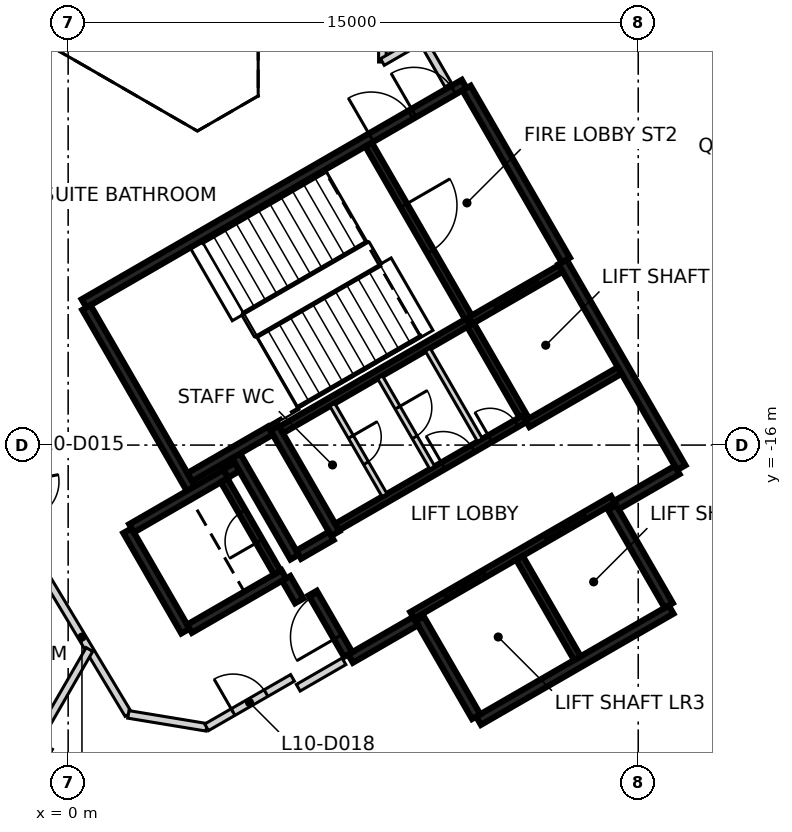
"""IFC4 building model, lengths in metres.
Left out: names, types, materials, properties, quantities, classifications, styles, units other than length and angle.
Written with IfcOpenShell. Run it as: python <this file> out.ifc"""

import sys

from ifc_helpers import new_model, si_unit, direction, frame, frame_2d, origin, place, context, subcontext, project, spatial, rectangle, extrude, element, fill, save


model = new_model("IFC4")
c1 = context("Model", 3, precision=1e-05, world=origin(), true_north=direction((0.0, 1.0)))
c2 = subcontext(c1, "Body", "Model", "MODEL_VIEW")
j1 = project(units=[si_unit("LENGTHUNIT", "METRE"), si_unit("PLANEANGLEUNIT", "RADIAN")], contexts=[c1])
p1 = place(None, origin())
s1 = spatial("IfcSite", under=j1, at=p1, CompositionType="ELEMENT")
p2 = place(p1, origin())
s2 = spatial("IfcBuilding", under=s1, at=p2, CompositionType="ELEMENT")
p3 = place(p2, frame((0.0, 0.0, 49.4)))
s3 = spatial("IfcBuildingStorey", under=s2, at=p3, CompositionType="ELEMENT", Elevation=49.4)
p4 = place(p3, frame((0.417, -12.273, 0.0), z_axis=(0.0, 0.0, 1.0), x_axis=(0.866021906294, 0.500006057782, 0.0)))
e1 = element("IfcWall", 1, at=p4, inside=s3, PredefinedType="SHEAR", context=c2, shape_type="SweptSolid", body=[
    extrude(rectangle(XDim=11.55, YDim=0.25, at=frame_2d((5.775, 0.0))), origin(), (0.0, 0.0, 1.0), 3.125),
])
p5 = place(p4, frame((10.025, 0.0, 0.0)))
e2 = element("IfcOpeningElement", 2, at=p5, cuts=e1, PredefinedType="OPENING", context=c2, shape_type="SweptSolid", body=[
    extrude(rectangle(XDim=1.2, YDim=2.1, at=frame_2d((0.6, 1.05))), frame((0.0, 0.135, 0.0), z_axis=(0.0, -1.0, 0.0), x_axis=(1.0, 0.0, 0.0)), (0.0, 0.0, 1.0), 0.27),
])
p6 = place(p4, frame((8.725, 0.0, 0.0)))
e3 = element("IfcOpeningElement", 3, at=p6, cuts=e1, PredefinedType="OPENING", context=c2, shape_type="SweptSolid", body=[
    extrude(rectangle(XDim=1.2, YDim=2.1, at=frame_2d((0.6, 1.05))), frame((0.0, 0.135, 0.0), z_axis=(0.0, -1.0, 0.0), x_axis=(1.0, 0.0, 0.0)), (0.0, 0.0, 1.0), 0.27),
])
p7 = place(p3, frame((13.008, -11.181, 0.0), z_axis=(0.0, 0.0, 1.0), x_axis=(0.500004234368, -0.866022959057, 0.0)))
e4 = element("IfcWall", 4, at=p7, inside=s3, PredefinedType="SHEAR", context=c2, shape_type="SweptSolid", body=[
    extrude(rectangle(XDim=6.25, YDim=0.25, at=frame_2d((3.125, 0.0))), origin(), (0.0, 0.0, 1.0), 3.125),
])
p8 = place(p3, frame((15.865, -20.328, 0.0), z_axis=(0.0, 0.0, 1.0), x_axis=(-0.86602852612, -0.499994591916, 0.0)))
e5 = element("IfcWall", 5, at=p8, inside=s3, PredefinedType="SHEAR", context=c2, shape_type="SweptSolid", body=[
    extrude(rectangle(XDim=5.85, YDim=0.25, at=frame_2d((2.925, 0.0))), origin(), (0.0, 0.0, 1.0), 3.125),
])
p9 = place(p3, frame((3.235, -17.153, 0.0), z_axis=(0.0, 0.0, 1.0), x_axis=(-0.500008851346, 0.866020293397, 0.0)))
e6 = element("IfcWall", 6, at=p9, inside=s3, PredefinedType="SHEAR", context=c2, shape_type="SweptSolid", body=[
    extrude(rectangle(XDim=5.51, YDim=0.25, at=frame_2d((2.755, 0.0))), origin(), (0.0, 0.0, 1.0), 3.125),
])
p10 = place(p3, frame((10.483, -6.606, 0.0), z_axis=(0.0, 0.0, 1.0), x_axis=(0.49999885962, -0.866026062182, 0.0)))
e7 = element("IfcWall", 7, at=p10, inside=s3, PredefinedType="SHEAR", context=c2, shape_type="SweptSolid", body=[
    extrude(rectangle(XDim=5.225, YDim=0.25, at=frame_2d((2.612, 0.0))), origin(), (0.0, 0.0, 1.0), 3.125),
])
p11 = place(p3, frame((7.031, -18.327, 0.0), z_axis=(0.0, 0.0, 1.0), x_axis=(-0.499971222258, 0.866042017984, 0.0)))
e8 = element("IfcWall", 8, at=p11, inside=s3, PredefinedType="SHEAR", context=c2, shape_type="SweptSolid", body=[
    extrude(rectangle(XDim=3.2, YDim=0.25, at=frame_2d((1.6, 0.0))), origin(), (0.0, 0.0, 1.0), 3.125),
])
for number, where, z_axis, x_axis in (
    (9, (14.315, -17.644, 0.0), (0.0, 0.0, 1.0), (0.5, -0.866, 0.0)),
    (10, (10.736, -23.145, 0.0), (0.0, 0.0, 1.0), (-0.5, 0.866, 0.0)),
):
    element("IfcWall", number, at=place(p3, frame(where, z_axis=z_axis, x_axis=x_axis)), inside=s3, PredefinedType="SHEAR", context=c2, shape_type="SweptSolid", body=[
        extrude(rectangle(XDim=2.974, YDim=0.25, at=frame_2d((1.487, 0.0))), origin(), (0.0, 0.0, 1.0), 3.125),
    ])
p12 = place(p3, frame((3.085, -20.894, 0.0), z_axis=(0.0, 0.0, 1.0), x_axis=(-0.499978833458, 0.866037623948, 0.0)))
e11 = element("IfcWall", 11, at=p12, inside=s3, PredefinedType="SHEAR", context=c2, shape_type="SweptSolid", body=[
    extrude(rectangle(XDim=3.05, YDim=0.25, at=frame_2d((1.525, 0.0))), origin(), (0.0, 0.0, 1.0), 3.125),
])
p13 = place(p3, frame((1.669, -18.19, 0.0), z_axis=(0.0, 0.0, 1.0), x_axis=(0.866042235819, 0.499970844928, 0.0)))
e12 = element("IfcWall", 12, at=p13, inside=s3, PredefinedType="SHEAR", context=c2, shape_type="SweptSolid", body=[
    extrude(rectangle(XDim=2.865, YDim=0.25, at=frame_2d((1.432, 0.0))), origin(), (0.0, 0.0, 1.0), 3.125),
])
p14 = place(p3, frame((5.675, -19.399, 0.0), z_axis=(0.0, 0.0, 1.0), x_axis=(-0.866026637627, -0.499997862916, 0.0)))
e13 = element("IfcWall", 13, at=p14, inside=s3, PredefinedType="SHEAR", context=c2, shape_type="SweptSolid", body=[
    extrude(rectangle(XDim=2.865, YDim=0.25, at=frame_2d((1.432, 0.0))), origin(), (0.0, 0.0, 1.0), 3.125),
])
p15 = place(p3, frame((4.414, -16.276, 0.0), z_axis=(0.0, 0.0, 1.0), x_axis=(0.500003324108, -0.866023484601, 0.0)))
e14 = element("IfcWall", 14, at=p15, inside=s3, PredefinedType="SHEAR", context=c2, shape_type="SweptSolid", body=[
    extrude(rectangle(XDim=3.085, YDim=0.25, at=frame_2d((1.542, 0.0))), origin(), (0.0, 0.0, 1.0), 3.125),
])
p16 = place(p3, frame((5.322, -15.619, 0.0), z_axis=(0.0, 0.0, 1.0), x_axis=(-0.866026229868, -0.499998569178, 0.0)))
e15 = element("IfcWall", 15, at=p16, inside=s3, PredefinedType="SHEAR", context=c2, shape_type="SweptSolid", body=[
    extrude(rectangle(XDim=2.449, YDim=0.25, at=frame_2d((1.225, 0.0))), origin(), (0.0, 0.0, 1.0), 3.125),
])
p17 = place(p3, frame((9.14, -20.631, 0.0), z_axis=(0.0, 0.0, 1.0), x_axis=(-0.866043531843, -0.499968599967, 0.0)))
e16 = element("IfcWall", 16, at=p17, inside=s3, PredefinedType="SHEAR", context=c2, shape_type="SweptSolid", body=[
    extrude(rectangle(XDim=1.975, YDim=0.25, at=frame_2d((0.987, 0.0))), origin(), (0.0, 0.0, 1.0), 3.125),
])
p18 = place(p3, frame((16.025, -16.656, 0.0), z_axis=(0.0, 0.0, 1.0), x_axis=(-0.866016279763, -0.500015802937, 0.0)))
e17 = element("IfcWall", 17, at=p18, inside=s3, PredefinedType="SHEAR", context=c2, shape_type="SweptSolid", body=[
    extrude(rectangle(XDim=1.849, YDim=0.25, at=frame_2d((0.925, 0.0))), origin(), (0.0, 0.0, 1.0), 3.125),
])
p19 = place(p3, frame((7.367, -21.51, 0.0), z_axis=(0.0, 0.0, 1.0), x_axis=(-0.499983108224, 0.866035156036, 0.0)))
e18 = element("IfcWall", 18, at=p19, inside=s3, PredefinedType="SHEAR", context=c2, shape_type="SweptSolid", body=[
    extrude(rectangle(XDim=1.865, YDim=0.25, at=frame_2d((0.932, 0.0))), origin(), (0.0, 0.0, 1.0), 3.125),
])
p20 = place(p19, frame((0.535, 0.0, 0.0)))
e19 = element("IfcOpeningElement", 19, at=p20, cuts=e18, PredefinedType="OPENING", context=c2, shape_type="SweptSolid", body=[
    extrude(rectangle(XDim=1.25, YDim=2.1, at=frame_2d((0.625, 1.05))), frame((0.0, 0.135, 0.0), z_axis=(0.0, -1.0, 0.0), x_axis=(1.0, 0.0, 0.0)), (0.0, 0.0, 1.0), 0.27),
])
p21 = place(p3, frame((6.065, -18.885, 0.0), z_axis=(0.0, 0.0, 1.0), x_axis=(0.866017078145, 0.500014420154, 0.0)))
e20 = element("IfcWall", 20, at=p21, inside=s3, PredefinedType="SHEAR", context=c2, shape_type="SweptSolid", body=[
    extrude(rectangle(XDim=0.989, YDim=0.25, at=frame_2d((0.495, 0.0))), origin(), (0.0, 0.0, 1.0), 3.125),
])
p22 = place(p3, frame((6.08, -20.1, 0.0), z_axis=(0.0, 0.0, 1.0), x_axis=(-0.500051773299, 0.865995510393, 0.0)))
e21 = element("IfcWall", 21, at=p22, inside=s3, PredefinedType="SHEAR", context=c2, shape_type="SweptSolid", body=[
    extrude(rectangle(XDim=0.685, YDim=0.25, at=frame_2d((0.342, 0.0))), origin(), (0.0, 0.0, 1.0), 3.125),
])
p23 = place(p3, frame((4.145, -16.749, 0.0), z_axis=(0.0, 0.0, 1.0), x_axis=(0.866185586049, 0.49972245349, 0.0)))
e22 = element("IfcWall", 22, at=p23, inside=s3, PredefinedType="SHEAR", context=c2, shape_type="SweptSolid", body=[
    extrude(rectangle(XDim=0.344, YDim=0.25, at=frame_2d((0.172, 0.0))), origin(), (0.0, 0.0, 1.0), 3.125),
])
p24 = place(p3, frame((9.052, -20.48, 0.0), z_axis=(0.0, 0.0, 1.0), x_axis=(0.866030299012, 0.499991521122, 0.0)))
e23 = element("IfcWall", 23, at=p24, inside=s3, PredefinedType="SHEAR", context=c2, shape_type="SweptSolid", body=[
    extrude(rectangle(XDim=6.1, YDim=0.2, at=frame_2d((3.05, 0.0))), origin(), (0.0, 0.0, 1.0), 3.125),
])
p25 = place(p24, frame((1.0, 0.0, 0.0)))
e24 = element("IfcOpeningElement", 24, at=p25, cuts=e23, PredefinedType="OPENING", context=c2, shape_type="SweptSolid", body=[
    extrude(rectangle(XDim=1.2, YDim=2.1, at=frame_2d((0.6, 1.05))), frame((0.0, 0.11, 0.0), z_axis=(0.0, -1.0, 0.0), x_axis=(1.0, 0.0, 0.0)), (0.0, 0.0, 1.0), 0.22),
])
p26 = place(p24, frame((4.05, 0.0, 0.0)))
e25 = element("IfcOpeningElement", 25, at=p26, cuts=e23, PredefinedType="OPENING", context=c2, shape_type="SweptSolid", body=[
    extrude(rectangle(XDim=1.2, YDim=2.1, at=frame_2d((0.6, 1.05))), frame((0.0, 0.11, 0.0), z_axis=(0.0, -1.0, 0.0), x_axis=(1.0, 0.0, 0.0)), (0.0, 0.0, 1.0), 0.22),
])
p27 = place(p3, frame((10.538, -12.752, 0.0), z_axis=(0.0, 0.0, 1.0), x_axis=(-0.866038630372, -0.499977090179, 0.0)))
e26 = element("IfcWall", 26, at=p27, inside=s3, PredefinedType="SHEAR", context=c2, shape_type="SweptSolid", body=[
    extrude(rectangle(XDim=5.699, YDim=0.2, at=frame_2d((2.85, 0.0))), origin(), (0.0, 0.0, 1.0), 3.125),
])
p28 = place(p3, frame((7.077, -18.156, 0.0), z_axis=(0.0, 0.0, 1.0), x_axis=(0.866038630372, 0.499977090179, 0.0)))
e27 = element("IfcWall", 27, at=p28, inside=s3, PredefinedType="SHEAR", context=c2, shape_type="SweptSolid", body=[
    extrude(rectangle(XDim=5.699, YDim=0.2, at=frame_2d((2.85, 0.0))), origin(), (0.0, 0.0, 1.0), 3.125),
])
p29 = place(p28, frame((3.224, 0.0, 0.0)))
e28 = element("IfcOpeningElement", 28, at=p29, cuts=e27, PredefinedType="OPENING", context=c2, shape_type="SweptSolid", body=[
    extrude(rectangle(XDim=0.9, YDim=2.1, at=frame_2d((0.45, 1.05))), frame((0.0, 0.11, 0.0), z_axis=(0.0, -1.0, 0.0), x_axis=(1.0, 0.0, 0.0)), (0.0, 0.0, 1.0), 0.22),
])
p30 = place(p28, frame((4.649, 0.0, 0.0)))
e29 = element("IfcOpeningElement", 29, at=p30, cuts=e27, PredefinedType="OPENING", context=c2, shape_type="SweptSolid", body=[
    extrude(rectangle(XDim=0.8, YDim=2.1, at=frame_2d((0.4, 1.05))), frame((0.0, 0.11, 0.0), z_axis=(0.0, -1.0, 0.0), x_axis=(1.0, 0.0, 0.0)), (0.0, 0.0, 1.0), 0.22),
])
p31 = place(p3, frame((7.906, -8.094, 0.0), z_axis=(0.0, 0.0, 1.0), x_axis=(0.500024287448, -0.866011380966, 0.0)))
e30 = element("IfcWall", 30, at=p31, inside=s3, PredefinedType="SHEAR", context=c2, shape_type="SweptSolid", body=[
    extrude(rectangle(XDim=5.251, YDim=0.2, at=frame_2d((2.625, 0.0))), origin(), (0.0, 0.0, 1.0), 3.125),
])
p32 = place(p31, frame((1.849, 0.0, 0.0)))
e31 = element("IfcOpeningElement", 31, at=p32, cuts=e30, PredefinedType="OPENING", context=c2, shape_type="SweptSolid", body=[
    extrude(rectangle(XDim=1.4, YDim=2.1, at=frame_2d((0.7, 1.05))), frame((0.0, 0.11, 0.0), z_axis=(0.0, -1.0, 0.0), x_axis=(1.0, 0.0, 0.0)), (0.0, 0.0, 1.0), 0.22),
])
p33 = place(p3, frame((11.875, -18.967, 0.0), z_axis=(0.0, 0.0, 1.0), x_axis=(0.49998131003, -0.866036194175, 0.0)))
e32 = element("IfcWall", 32, at=p33, inside=s3, PredefinedType="SHEAR", context=c2, shape_type="SweptSolid", body=[
    extrude(rectangle(XDim=3.048, YDim=0.2, at=frame_2d((1.524, 0.0))), origin(), (0.0, 0.0, 1.0), 3.125),
])
p34 = place(p3, frame((5.503, -19.352, 0.0), z_axis=(0.0, 0.0, 1.0), x_axis=(-0.499986818241, 0.866033014143, 0.0)))
e33 = element("IfcWall", 33, at=p34, inside=s3, PredefinedType="SHEAR", context=c2, shape_type="SweptSolid", body=[
    extrude(rectangle(XDim=2.798, YDim=0.2, at=frame_2d((1.399, 0.0))), origin(), (0.0, 0.0, 1.0), 3.125),
])
p35 = place(p34, frame((0.949, 0.0, 0.0)))
e34 = element("IfcOpeningElement", 34, at=p35, cuts=e33, PredefinedType="OPENING", context=c2, shape_type="SweptSolid", body=[
    extrude(rectangle(XDim=0.9, YDim=2.1, at=frame_2d((0.45, 1.05))), frame((0.0, 0.11, 0.0), z_axis=(0.0, -1.0, 0.0), x_axis=(1.0, 0.0, 0.0)), (0.0, 0.0, 1.0), 0.22),
])
p36 = place(p3, frame((11.963, -15.22, 0.0), z_axis=(0.0, 0.0, 1.0), x_axis=(-0.500034990121, 0.866005201286, 0.0)))
e35 = element("IfcWall", 35, at=p36, inside=s3, PredefinedType="SHEAR", context=c2, shape_type="SweptSolid", body=[
    extrude(rectangle(XDim=2.75, YDim=0.2, at=frame_2d((1.375, 0.0))), origin(), (0.0, 0.0, 1.0), 3.125),
])
p37 = place(p3, frame((10.587, -12.723, 0.0), z_axis=(0.0, 0.0, 1.0), x_axis=(0.866037306777, 0.499979382845, 0.0)))
e36 = element("IfcWall", 36, at=p37, inside=s3, PredefinedType="SHEAR", context=c2, shape_type="SweptSolid", body=[
    extrude(rectangle(XDim=2.742, YDim=0.2, at=frame_2d((1.371, 0.0))), origin(), (0.0, 0.0, 1.0), 3.125),
])
p38 = place(p37, frame((0.743, 0.0, 0.0)))
e37 = element("IfcOpeningElement", 37, at=p38, cuts=e36, PredefinedType="OPENING", context=c2, shape_type="SweptSolid", body=[
    extrude(rectangle(XDim=1.3, YDim=2.1, at=frame_2d((0.65, 1.05))), frame((0.0, 0.11, 0.0), z_axis=(0.0, -1.0, 0.0), x_axis=(1.0, 0.0, 0.0)), (0.0, 0.0, 1.0), 0.22),
])
p39 = place(p3, frame((14.512, -14.037, 0.0), z_axis=(0.0, 0.0, 1.0), x_axis=(-0.866044696403, -0.499966582715, 0.0)))
e38 = element("IfcWall", 38, at=p39, inside=s3, PredefinedType="SHEAR", context=c2, shape_type="SweptSolid", body=[
    extrude(rectangle(XDim=2.799, YDim=0.2, at=frame_2d((1.399, 0.0))), origin(), (0.0, 0.0, 1.0), 3.125),
])
p40 = place(p3, frame((8.207, -14.214, 0.0), z_axis=(0.0, 0.0, 1.0), x_axis=(0.50002746344, -0.86600954718, 0.0)))
e39 = element("IfcWall", 39, at=p40, inside=s3, PredefinedType="PARTITIONING", context=c2, shape_type="SweptSolid", body=[
    extrude(rectangle(XDim=2.748, YDim=0.15, at=frame_2d((1.374, 0.0))), origin(), (0.0, 0.0, 1.0), 3.125),
])
p41 = place(p40, frame((0.924, 0.0, 0.0)))
e40 = element("IfcOpeningElement", 40, at=p41, cuts=e39, PredefinedType="OPENING", context=c2, shape_type="SweptSolid", body=[
    extrude(rectangle(XDim=0.9, YDim=2.1, at=frame_2d((0.45, 1.05))), frame((0.0, 0.085, 0.0), z_axis=(0.0, -1.0, 0.0), x_axis=(1.0, 0.0, 0.0)), (0.0, 0.0, 1.0), 0.17),
])
p42 = place(p3, frame((9.462, -13.489, 0.0), z_axis=(0.0, 0.0, 1.0), x_axis=(0.499988999718, -0.866031754707, 0.0)))
e41 = element("IfcWall", 41, at=p42, inside=s3, PredefinedType="PARTITIONING", context=c2, shape_type="SweptSolid", body=[
    extrude(rectangle(XDim=2.749, YDim=0.15, at=frame_2d((1.374, 0.0))), origin(), (0.0, 0.0, 1.0), 3.125),
])
p43 = place(p3, frame((6.951, -14.939, 0.0), z_axis=(0.0, 0.0, 1.0), x_axis=(0.499988999718, -0.866031754707, 0.0)))
e42 = element("IfcWall", 42, at=p43, inside=s3, PredefinedType="PARTITIONING", context=c2, shape_type="SweptSolid", body=[
    extrude(rectangle(XDim=2.749, YDim=0.15, at=frame_2d((1.374, 0.0))), origin(), (0.0, 0.0, 1.0), 3.125),
])
p44 = place(p43, frame((0.974, 0.0, 0.0)))
e43 = element("IfcOpeningElement", 43, at=p44, cuts=e42, PredefinedType="OPENING", context=c2, shape_type="SweptSolid", body=[
    extrude(rectangle(XDim=0.8, YDim=2.1, at=frame_2d((0.4, 1.05))), frame((0.0, 0.085, 0.0), z_axis=(0.0, -1.0, 0.0), x_axis=(1.0, 0.0, 0.0)), (0.0, 0.0, 1.0), 0.17),
])
p45 = place(p3, frame((-0.858, -19.017, 0.0), z_axis=(0.0, 0.0, 1.0), x_axis=(0.514647068805, -0.857402119528, 0.0)))
e44 = element("IfcWall", 44, at=p45, inside=s3, PredefinedType="PARTITIONING", context=c2, shape_type="SweptSolid", body=[
    extrude(rectangle(XDim=4.745, YDim=0.2, at=frame_2d((2.373, 0.0))), origin(), (0.0, 0.0, 1.0), 3.125),
])
p46 = place(p3, frame((1.584, -23.086, 0.0), z_axis=(0.0, 0.0, 1.0), x_axis=(0.986633159246, -0.162957077405, 0.0)))
e45 = element("IfcWall", 45, at=p46, inside=s3, PredefinedType="PARTITIONING", context=c2, shape_type="SweptSolid", body=[
    extrude(rectangle(XDim=2.087, YDim=0.2, at=frame_2d((1.043, 0.0))), origin(), (0.0, 0.0, 1.0), 3.125),
])
p47 = place(p3, frame((3.643, -23.426, 0.0), z_axis=(0.0, 0.0, 1.0), x_axis=(0.866654350985, 0.498909045738, 0.0)))
e46 = element("IfcWall", 46, at=p47, inside=s3, PredefinedType="PARTITIONING", context=c2, shape_type="SweptSolid", body=[
    extrude(rectangle(XDim=2.608, YDim=0.2, at=frame_2d((1.304, 0.0))), origin(), (0.0, 0.0, 1.0), 3.125),
])
p48 = place(p47, frame((0.804, 0.0, 0.0)))
e47 = element("IfcOpeningElement", 47, at=p48, cuts=e46, PredefinedType="OPENING", context=c2, shape_type="SweptSolid", body=[
    extrude(rectangle(XDim=1.0, YDim=2.1, at=frame_2d((0.5, 1.05))), frame((0.0, 0.11, 0.0), z_axis=(0.0, -1.0, 0.0), x_axis=(1.0, 0.0, 0.0)), (0.0, 0.0, 1.0), 0.22),
])
p49 = place(p3, frame((6.054, -22.385, 0.0), z_axis=(0.0, 0.0, 1.0), x_axis=(0.86593101922, 0.500163443238, 0.0)))
e48 = element("IfcWall", 48, at=p49, inside=s3, PredefinedType="PARTITIONING", context=c2, shape_type="SweptSolid", body=[
    extrude(rectangle(XDim=1.39, YDim=0.2, at=frame_2d((0.695, 0.0))), origin(), (0.0, 0.0, 1.0), 3.125),
])
p50 = place(p3, frame((8.268, -5.921, 0.0), z_axis=(0.0, 0.0, 1.0), x_axis=(0.0, 1.0, 0.0)))
e49 = element("IfcWall", 49, at=p50, inside=s3, PredefinedType="PARTITIONING", context=c2, shape_type="SweptSolid", body=[
    extrude(rectangle(XDim=1.2, YDim=0.2, at=frame_2d((0.6, 0.0))), origin(), (0.0, 0.0, 1.0), 3.125),
])
p51 = place(p3, frame((8.268, -5.921, 0.0), z_axis=(0.0, 0.0, 1.0), x_axis=(0.866344856625, 0.499446282797, 0.0)))
e50 = element("IfcWall", 50, at=p51, inside=s3, PredefinedType="PARTITIONING", context=c2, shape_type="SweptSolid", body=[
    extrude(rectangle(XDim=1.199, YDim=0.2, at=frame_2d((0.6, 0.0))), origin(), (0.0, 0.0, 1.0), 3.125),
])
p52 = place(p3, frame((9.307, -5.322, 0.0), z_axis=(0.0, 0.0, 1.0), x_axis=(0.500295157811, -0.865854927266, 0.0)))
e51 = element("IfcWall", 51, at=p52, inside=s3, PredefinedType="PARTITIONING", context=c2, shape_type="SweptSolid", body=[
    extrude(rectangle(XDim=1.39, YDim=0.2, at=frame_2d((0.695, 0.0))), origin(), (0.0, 0.0, 1.0), 3.125),
])
p53 = place(p3, frame((-2.462, -26.615, 0.0), z_axis=(0.0, 0.0, 1.0), x_axis=(0.49992636536, 0.86606791259, 0.0)))
e52 = element("IfcWall", 52, at=p53, inside=s3, PredefinedType="PARTITIONING", context=c2, shape_type="SweptSolid", body=[
    extrude(rectangle(XDim=6.046, YDim=0.2, at=frame_2d((3.023, 0.0))), origin(), (0.0, 0.0, 1.0), 3.125),
])
p54 = place(p38, origin())
e53 = element("IfcDoor", 53, at=p54, inside=s3, OperationType="SLIDING_TO_LEFT", PredefinedType="DOOR", context=c2, shape_type="SweptSolid", body=[
    extrude(rectangle(XDim=1.3, YDim=2.1, at=frame_2d((0.65, 1.05))), frame((0.0, 0.025, 0.0), z_axis=(0.0, -1.0, 0.0), x_axis=(1.0, 0.0, 0.0)), (0.0, 0.0, 1.0), 0.05),
])
fill(e37, e53)
p55 = place(p25, origin())
e54 = element("IfcDoor", 54, at=p55, inside=s3, OperationType="DOUBLE_DOOR_SLIDING", PredefinedType="DOOR", context=c2, shape_type="SweptSolid", body=[
    extrude(rectangle(XDim=1.2, YDim=2.1, at=frame_2d((0.6, 1.05))), frame((0.0, 0.025, 0.0), z_axis=(0.0, -1.0, 0.0), x_axis=(1.0, 0.0, 0.0)), (0.0, 0.0, 1.0), 0.05),
])
fill(e24, e54)
p56 = place(p26, origin())
e55 = element("IfcDoor", 55, at=p56, inside=s3, OperationType="DOUBLE_DOOR_SLIDING", PredefinedType="DOOR", context=c2, shape_type="SweptSolid", body=[
    extrude(rectangle(XDim=1.2, YDim=2.1, at=frame_2d((0.6, 1.05))), frame((0.0, 0.025, 0.0), z_axis=(0.0, -1.0, 0.0), x_axis=(1.0, 0.0, 0.0)), (0.0, 0.0, 1.0), 0.05),
])
fill(e25, e55)
p57 = place(p20, origin())
e56 = element("IfcDoor", 56, at=p57, inside=s3, OperationType="SINGLE_SWING_LEFT", PredefinedType="DOOR", context=c2, shape_type="SweptSolid", body=[
    extrude(rectangle(XDim=1.25, YDim=2.1, at=frame_2d((0.625, 1.05))), frame((0.0, 0.025, 0.0), z_axis=(0.0, -1.0, 0.0), x_axis=(1.0, 0.0, 0.0)), (0.0, 0.0, 1.0), 0.05),
])
fill(e19, e56)
p58 = place(p5, origin())
e57 = element("IfcDoor", 57, at=p58, inside=s3, OperationType="SINGLE_SWING_LEFT", PredefinedType="DOOR", context=c2, shape_type="SweptSolid", body=[
    extrude(rectangle(XDim=1.2, YDim=2.1, at=frame_2d((0.6, 1.05))), frame((0.0, 0.025, 0.0), z_axis=(0.0, -1.0, 0.0), x_axis=(1.0, 0.0, 0.0)), (0.0, 0.0, 1.0), 0.05),
])
fill(e2, e57)
p59 = place(p6, origin())
e58 = element("IfcDoor", 58, at=p59, inside=s3, OperationType="SINGLE_SWING_RIGHT", PredefinedType="DOOR", context=c2, shape_type="SweptSolid", body=[
    extrude(rectangle(XDim=1.2, YDim=2.1, at=frame_2d((0.6, 1.05))), frame((0.0, 0.025, 0.0), z_axis=(0.0, -1.0, 0.0), x_axis=(1.0, 0.0, 0.0)), (0.0, 0.0, 1.0), 0.05),
])
fill(e3, e58)
p60 = place(p32, origin())
e59 = element("IfcDoor", 59, at=p60, inside=s3, OperationType="SINGLE_SWING_LEFT", PredefinedType="DOOR", context=c2, shape_type="SweptSolid", body=[
    extrude(rectangle(XDim=1.4, YDim=2.1, at=frame_2d((0.7, 1.05))), frame((0.0, 0.025, 0.0), z_axis=(0.0, -1.0, 0.0), x_axis=(1.0, 0.0, 0.0)), (0.0, 0.0, 1.0), 0.05),
])
fill(e31, e59)
p61 = place(p29, origin())
e60 = element("IfcDoor", 60, at=p61, inside=s3, OperationType="SINGLE_SWING_RIGHT", PredefinedType="DOOR", context=c2, shape_type="SweptSolid", body=[
    extrude(rectangle(XDim=0.9, YDim=2.1, at=frame_2d((0.45, 1.05))), frame((0.0, 0.025, 0.0), z_axis=(0.0, -1.0, 0.0), x_axis=(1.0, 0.0, 0.0)), (0.0, 0.0, 1.0), 0.05),
])
fill(e28, e60)
p62 = place(p30, origin())
e61 = element("IfcDoor", 61, at=p62, inside=s3, OperationType="SINGLE_SWING_LEFT", PredefinedType="DOOR", context=c2, shape_type="SweptSolid", body=[
    extrude(rectangle(XDim=0.8, YDim=2.1, at=frame_2d((0.4, 1.05))), frame((0.0, 0.025, 0.0), z_axis=(0.0, -1.0, 0.0), x_axis=(1.0, 0.0, 0.0)), (0.0, 0.0, 1.0), 0.05),
])
fill(e29, e61)
p63 = place(p35, origin())
e62 = element("IfcDoor", 62, at=p63, inside=s3, OperationType="SINGLE_SWING_RIGHT", PredefinedType="DOOR", context=c2, shape_type="SweptSolid", body=[
    extrude(rectangle(XDim=0.9, YDim=2.1, at=frame_2d((0.45, 1.05))), frame((0.0, 0.025, 0.0), z_axis=(0.0, -1.0, 0.0), x_axis=(1.0, 0.0, 0.0)), (0.0, 0.0, 1.0), 0.05),
])
fill(e34, e62)
p64 = place(p41, origin())
e63 = element("IfcDoor", 63, at=p64, inside=s3, OperationType="SINGLE_SWING_LEFT", PredefinedType="DOOR", context=c2, shape_type="SweptSolid", body=[
    extrude(rectangle(XDim=0.9, YDim=2.1, at=frame_2d((0.45, 1.05))), frame((0.0, 0.025, 0.0), z_axis=(0.0, -1.0, 0.0), x_axis=(1.0, 0.0, 0.0)), (0.0, 0.0, 1.0), 0.05),
])
fill(e40, e63)
p65 = place(p44, origin())
e64 = element("IfcDoor", 64, at=p65, inside=s3, OperationType="SINGLE_SWING_RIGHT", PredefinedType="DOOR", context=c2, shape_type="SweptSolid", body=[
    extrude(rectangle(XDim=0.8, YDim=2.1, at=frame_2d((0.4, 1.05))), frame((0.0, 0.025, 0.0), z_axis=(0.0, -1.0, 0.0), x_axis=(1.0, 0.0, 0.0)), (0.0, 0.0, 1.0), 0.05),
])
fill(e43, e64)
p66 = place(p48, frame((1.0, 0.0, 0.0), z_axis=(0.0, 0.0, 1.0), x_axis=(-1.0, 0.0, 0.0)))
e65 = element("IfcDoor", 65, at=p66, inside=s3, OperationType="SINGLE_SWING_LEFT", PredefinedType="DOOR", context=c2, shape_type="SweptSolid", body=[
    extrude(rectangle(XDim=1.0, YDim=2.1, at=frame_2d((0.5, 1.05))), frame((0.0, 0.025, 0.0), z_axis=(0.0, -1.0, 0.0), x_axis=(1.0, 0.0, 0.0)), (0.0, 0.0, 1.0), 0.05),
])
fill(e47, e65)
save(model, sys.argv[1])
